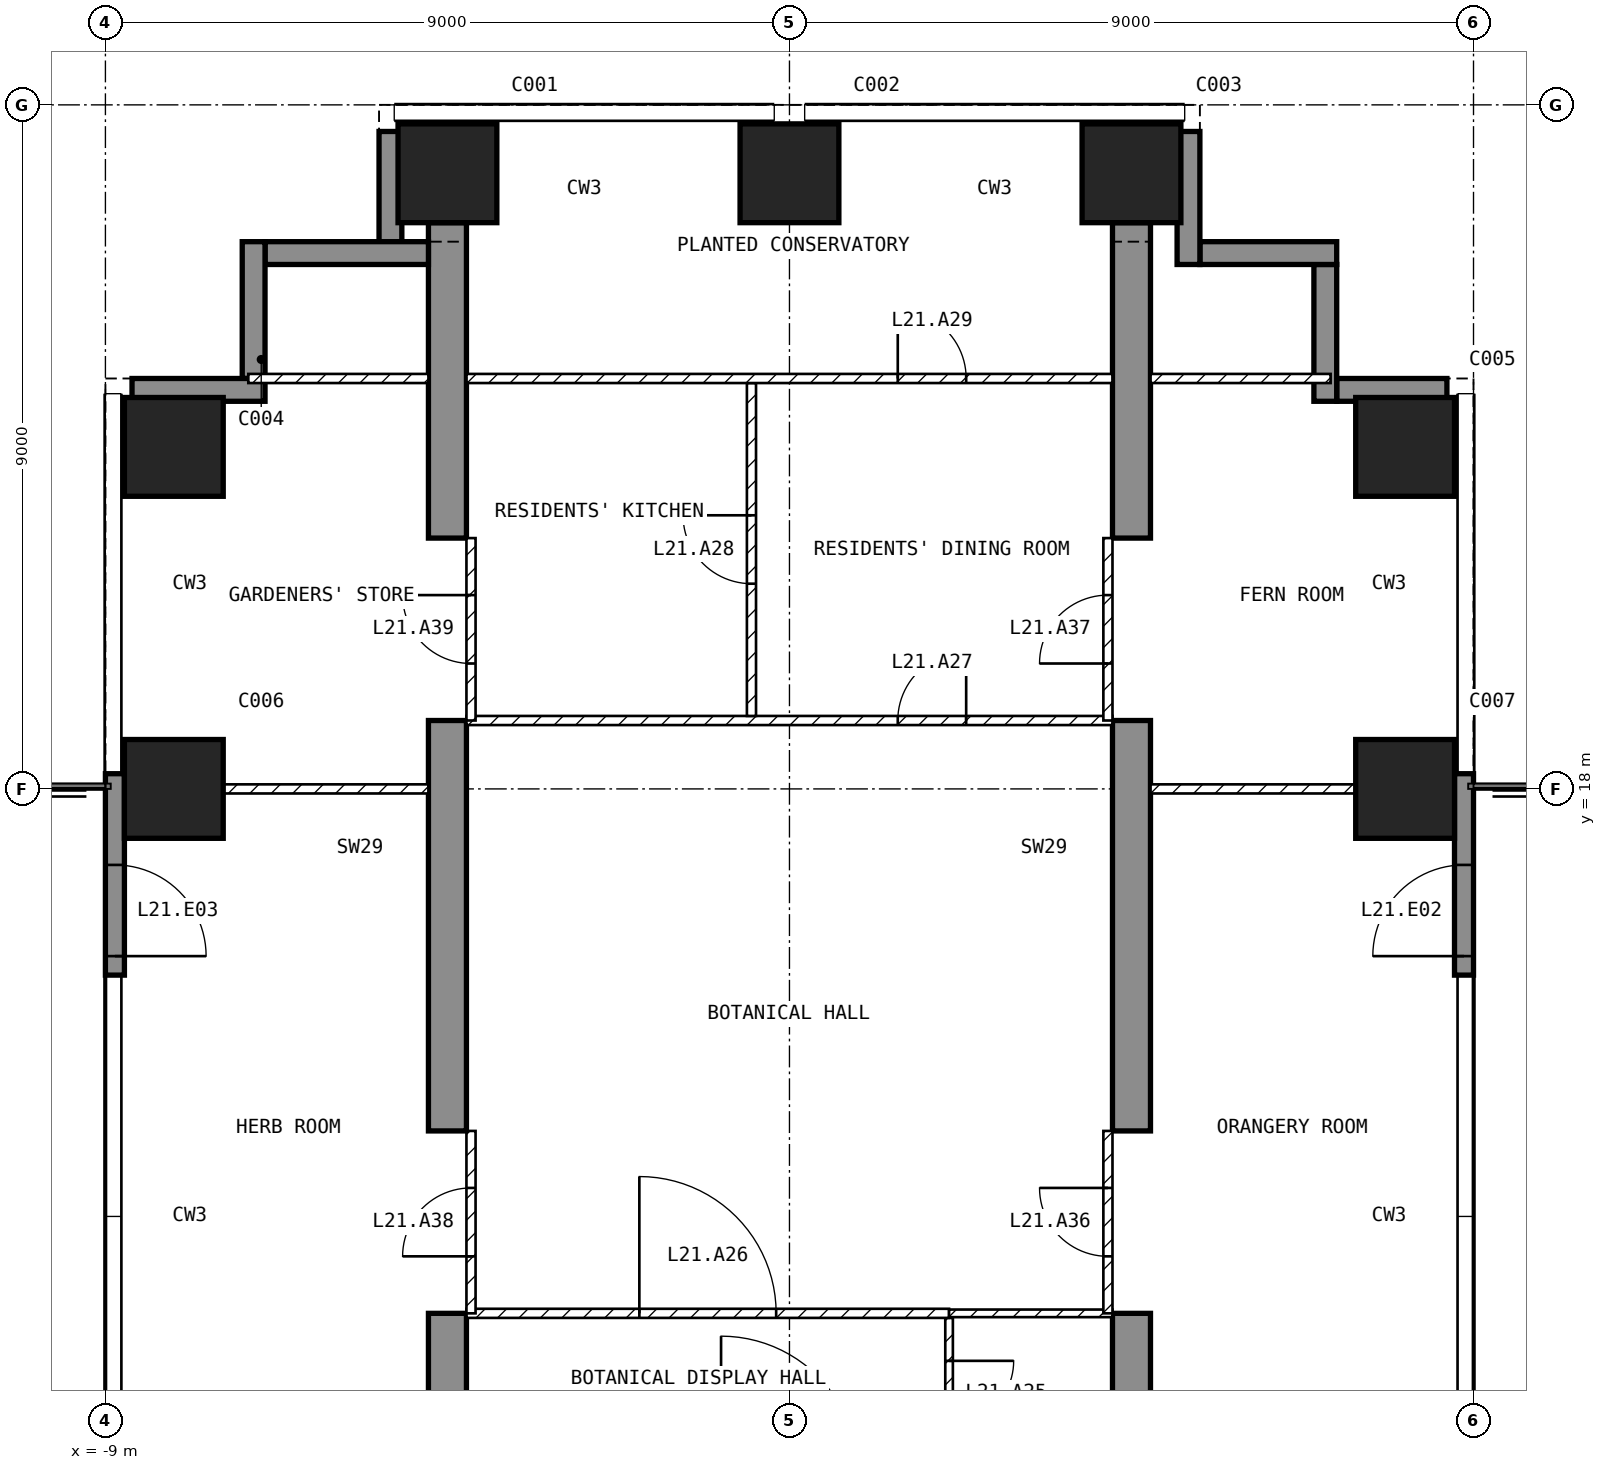
"""IFC4 building model, lengths in metres.
Left out: names, types, materials, properties, quantities, classifications, styles, units other than length and angle.
Written with IfcOpenShell. Run it as: python <this file> out.ifc"""

import sys

from ifc_helpers import new_model, si_unit, direction, frame, frame_2d, origin, origin_2d, place, context, subcontext, project, spatial, polyline, rectangle, outline, extrude, element, fill, save


model = new_model("IFC4")
c1 = context("Model", 3, precision=1e-05, world=origin(), true_north=direction((0.0, 1.0)))
c2 = subcontext(c1, "Body", "Model", "MODEL_VIEW")
j1 = project(units=[si_unit("LENGTHUNIT", "METRE"), si_unit("PLANEANGLEUNIT", "RADIAN")], contexts=[c1])
p1 = place(None, origin())
s1 = spatial("IfcSite", under=j1, at=p1, CompositionType="ELEMENT")
p2 = place(p1, origin())
s2 = spatial("IfcBuilding", under=s1, at=p2, CompositionType="ELEMENT")
p3 = place(p2, frame((0.0, 0.0, 92.5)))
s3 = spatial("IfcBuildingStorey", under=s2, at=p3, CompositionType="ELEMENT", Elevation=92.5)
for number, where, z_axis, x_axis in (
    (1, (-8.1, 18.0, -0.3), (0.0, 0.0, 1.0), (1.0, 0.0, 0.0)),
    (2, (-8.1, 22.5, -0.3), (0.0, 0.0, 1.0), (1.0, 0.0, 0.0)),
    (3, (-4.5, 26.1, -0.3), (0.0, 0.0, 1.0), (1.0, 0.0, 0.0)),
    (4, (0.0, 26.1, -0.3), (0.0, 0.0, 1.0), (1.0, 0.0, 0.0)),
    (5, (4.5, 26.1, -0.3), (0.0, 0.0, 1.0), (1.0, 0.0, 0.0)),
    (6, (8.1, 18.0, -0.3), (0.0, 0.0, 1.0), (1.0, 0.0, 0.0)),
    (7, (8.1, 22.5, -0.3), (0.0, 0.0, 1.0), (1.0, 0.0, 0.0)),
):
    element("IfcColumn", number, at=place(p3, frame(where, z_axis=z_axis, x_axis=x_axis)), inside=s3, PredefinedType="COLUMN", context=c2, shape_type="SweptSolid", body=[
        extrude(rectangle(XDim=1.3, YDim=1.3, at=origin_2d()), origin(), (0.0, 0.0, 1.0), 5.25),
    ])
for number, where, z_axis, x_axis in (
    (8, (-4.75, 9.0, -0.3), (1.0, 0.0, 0.0), (0.0, 1.0, 0.0)),
    (9, (4.25, 9.0, -0.3), (1.0, 0.0, 0.0), (0.0, 1.0, 0.0)),
):
    element("IfcWall", number, at=place(p3, frame(where, z_axis=z_axis, x_axis=x_axis)), inside=s3, PredefinedType="SHEAR", context=c2, shape_type="SweptSolid", body=[
        extrude(outline(polyline([(0.0, 0.0), (2.1, 0.0), (2.1, 2.7), (4.5, 2.7), (4.5, 0.0), (9.9, 0.0), (9.9, 2.7), (12.3, 2.7), (12.3, 0.0), (16.45, 0.0), (16.45, 5.25), (0.0, 5.25), (0.0, 0.0)])), origin(), (0.0, 0.0, 1.0), 0.5),
    ])
p4 = place(p3, frame((8.875, 15.55, 0.0), z_axis=(0.0, 0.0, 1.0), x_axis=(0.0, 1.0, 0.0)))
e10 = element("IfcWall", 10, at=p4, inside=s3, PredefinedType="SOLIDWALL", context=c2, shape_type="SweptSolid", body=[
    extrude(rectangle(XDim=2.65, YDim=0.25, at=frame_2d((1.325, 0.0))), origin(), (0.0, 0.0, 1.0), 4.95),
])
p5 = place(p4, frame((0.25, 0.0, 0.0)))
e11 = element("IfcOpeningElement", 11, at=p5, cuts=e10, PredefinedType="OPENING", context=c2, shape_type="SweptSolid", body=[
    extrude(rectangle(XDim=1.2, YDim=2.4, at=frame_2d((0.6, 1.2))), frame((0.0, 0.135, 0.0), z_axis=(0.0, -1.0, 0.0), x_axis=(1.0, 0.0, 0.0)), (0.0, 0.0, 1.0), 0.27),
])
p6 = place(p3, frame((-8.875, 18.2, 0.0), z_axis=(0.0, 0.0, 1.0), x_axis=(0.0, -1.0, 0.0)))
e12 = element("IfcWall", 12, at=p6, inside=s3, PredefinedType="SOLIDWALL", context=c2, shape_type="SweptSolid", body=[
    extrude(rectangle(XDim=2.65, YDim=0.25, at=frame_2d((1.325, 0.0))), origin(), (0.0, 0.0, 1.0), 4.95),
])
p7 = place(p6, frame((1.2, 0.0, 0.0)))
e13 = element("IfcOpeningElement", 13, at=p7, cuts=e12, PredefinedType="OPENING", context=c2, shape_type="SweptSolid", body=[
    extrude(rectangle(XDim=1.2, YDim=2.4, at=frame_2d((0.6, 1.2))), frame((0.0, 0.135, 0.0), z_axis=(0.0, -1.0, 0.0), x_axis=(1.0, 0.0, 0.0)), (0.0, 0.0, 1.0), 0.27),
])
p8 = place(p3, frame((8.65, 23.25, 0.0), z_axis=(0.0, 0.0, 1.0), x_axis=(-1.0, 0.0, 0.0)))
e14 = element("IfcWall", 14, at=p8, inside=s3, PredefinedType="SOLIDWALL", context=c2, shape_type="SweptSolid", body=[
    extrude(rectangle(XDim=1.45, YDim=0.3, at=frame_2d((0.725, 0.0))), origin(), (0.0, 0.0, 1.0), 4.95),
])
p9 = place(p3, frame((7.05, 23.1, 0.0), z_axis=(0.0, 0.0, 1.0), x_axis=(0.0, 1.0, 0.0)))
e15 = element("IfcWall", 15, at=p9, inside=s3, PredefinedType="SOLIDWALL", context=c2, shape_type="SweptSolid", body=[
    extrude(rectangle(XDim=1.8, YDim=0.3, at=frame_2d((0.9, 0.0))), origin(), (0.0, 0.0, 1.0), 4.95),
])
p10 = place(p3, frame((7.2, 25.05, 0.0), z_axis=(0.0, 0.0, 1.0), x_axis=(-1.0, 0.0, 0.0)))
e16 = element("IfcWall", 16, at=p10, inside=s3, PredefinedType="SOLIDWALL", context=c2, shape_type="SweptSolid", body=[
    extrude(rectangle(XDim=1.8, YDim=0.3, at=frame_2d((0.9, 0.0))), origin(), (0.0, 0.0, 1.0), 4.95),
])
p11 = place(p3, frame((5.25, 24.9, 0.0), z_axis=(0.0, 0.0, 1.0), x_axis=(0.0, 1.0, 0.0)))
e17 = element("IfcWall", 17, at=p11, inside=s3, PredefinedType="SOLIDWALL", context=c2, shape_type="SweptSolid", body=[
    extrude(rectangle(XDim=1.75, YDim=0.3, at=frame_2d((0.875, 0.0))), origin(), (0.0, 0.0, 1.0), 4.95),
])
p12 = place(p3, frame((-5.25, 26.65, 0.0), z_axis=(0.0, 0.0, 1.0), x_axis=(0.0, -1.0, 0.0)))
e18 = element("IfcWall", 18, at=p12, inside=s3, PredefinedType="SOLIDWALL", context=c2, shape_type="SweptSolid", body=[
    extrude(rectangle(XDim=1.45, YDim=0.3, at=frame_2d((0.725, 0.0))), origin(), (0.0, 0.0, 1.0), 4.95),
])
p13 = place(p3, frame((-4.75, 25.05, 0.0), z_axis=(0.0, 0.0, 1.0), x_axis=(-1.0, 0.0, 0.0)))
e19 = element("IfcWall", 19, at=p13, inside=s3, PredefinedType="SOLIDWALL", context=c2, shape_type="SweptSolid", body=[
    extrude(rectangle(XDim=2.15, YDim=0.3, at=frame_2d((1.075, 0.0))), origin(), (0.0, 0.0, 1.0), 4.95),
])
p14 = place(p3, frame((-7.05, 25.2, 0.0), z_axis=(0.0, 0.0, 1.0), x_axis=(0.0, -1.0, 0.0)))
e20 = element("IfcWall", 20, at=p14, inside=s3, PredefinedType="SOLIDWALL", context=c2, shape_type="SweptSolid", body=[
    extrude(rectangle(XDim=1.8, YDim=0.3, at=frame_2d((0.9, 0.0))), origin(), (0.0, 0.0, 1.0), 4.95),
])
p15 = place(p3, frame((-6.9, 23.25, 0.0), z_axis=(0.0, 0.0, 1.0), x_axis=(-1.0, 0.0, 0.0)))
e21 = element("IfcWall", 21, at=p15, inside=s3, PredefinedType="SOLIDWALL", context=c2, shape_type="SweptSolid", body=[
    extrude(rectangle(XDim=1.75, YDim=0.3, at=frame_2d((0.875, 0.0))), origin(), (0.0, 0.0, 1.0), 4.95),
])
p16 = place(p3, frame((2.1, 11.04, 0.0), z_axis=(0.0, 0.0, 1.0), x_axis=(0.0, -1.0, 0.0)))
e22 = element("IfcWall", 22, at=p16, inside=s3, PredefinedType="PARTITIONING", context=c2, shape_type="SweptSolid", body=[
    extrude(rectangle(XDim=1.98, YDim=0.1, at=frame_2d((0.99, 0.0))), origin(), (0.0, 0.0, 1.0), 4.95),
])
p17 = place(p16, frame((0.565, 0.0, 0.0)))
e23 = element("IfcOpeningElement", 23, at=p17, cuts=e22, PredefinedType="OPENING", context=c2, shape_type="SweptSolid", body=[
    extrude(rectangle(XDim=0.85, YDim=2.1, at=frame_2d((0.425, 1.05))), frame((0.0, 0.06, 0.0), z_axis=(0.0, -1.0, 0.0), x_axis=(1.0, 0.0, 0.0)), (0.0, 0.0, 1.0), 0.12),
])
p18 = place(p3, frame((-4.25, 11.1, 0.0), z_axis=(0.0, 0.0, 1.0), x_axis=(1.0, 0.0, 0.0)))
e24 = element("IfcWall", 24, at=p18, inside=s3, PredefinedType="PARTITIONING", context=c2, shape_type="SweptSolid", body=[
    extrude(rectangle(XDim=6.35, YDim=0.12, at=frame_2d((3.175, 0.0))), origin(), (0.0, 0.0, 1.0), 4.95),
])
p19 = place(p18, frame((2.275, 0.0, 0.0)))
e25 = element("IfcOpeningElement", 25, at=p19, cuts=e24, PredefinedType="OPENING", context=c2, shape_type="SweptSolid", body=[
    extrude(rectangle(XDim=1.8, YDim=2.1, at=frame_2d((0.9, 1.05))), frame((0.0, 0.07, 0.0), z_axis=(0.0, -1.0, 0.0), x_axis=(1.0, 0.0, 0.0)), (0.0, 0.0, 1.0), 0.14),
])
p20 = place(p3, frame((2.1, 11.1, 0.0), z_axis=(0.0, 0.0, 1.0), x_axis=(1.0, 0.0, 0.0)))
e26 = element("IfcWall", 26, at=p20, inside=s3, PredefinedType="PARTITIONING", context=c2, shape_type="SweptSolid", body=[
    extrude(rectangle(XDim=2.15, YDim=0.1, at=frame_2d((1.075, 0.0))), origin(), (0.0, 0.0, 1.0), 4.95),
])
p21 = place(p3, frame((-4.25, 18.9, 0.0), z_axis=(0.0, 0.0, 1.0), x_axis=(1.0, 0.0, 0.0)))
e27 = element("IfcWall", 27, at=p21, inside=s3, PredefinedType="PARTITIONING", context=c2, shape_type="SweptSolid", body=[
    extrude(rectangle(XDim=8.5, YDim=0.12, at=frame_2d((4.25, 0.0))), origin(), (0.0, 0.0, 1.0), 4.95),
])
p22 = place(p21, frame((5.675, 0.0, 0.0)))
e28 = element("IfcOpeningElement", 28, at=p22, cuts=e27, PredefinedType="OPENING", context=c2, shape_type="SweptSolid", body=[
    extrude(rectangle(XDim=0.9, YDim=2.1, at=frame_2d((0.45, 1.05))), frame((0.0, 0.07, 0.0), z_axis=(0.0, -1.0, 0.0), x_axis=(1.0, 0.0, 0.0)), (0.0, 0.0, 1.0), 0.14),
])
p23 = place(p3, frame((-0.5, 18.96, 0.0), z_axis=(0.0, 0.0, 1.0), x_axis=(0.0, 1.0, 0.0)))
e29 = element("IfcWall", 29, at=p23, inside=s3, PredefinedType="PARTITIONING", context=c2, shape_type="SweptSolid", body=[
    extrude(rectangle(XDim=4.38, YDim=0.12, at=frame_2d((2.19, 0.0))), origin(), (0.0, 0.0, 1.0), 4.95),
])
p24 = place(p23, frame((1.74, 0.0, 0.0)))
e30 = element("IfcOpeningElement", 30, at=p24, cuts=e29, PredefinedType="OPENING", context=c2, shape_type="SweptSolid", body=[
    extrude(rectangle(XDim=0.9, YDim=2.1, at=frame_2d((0.45, 1.05))), frame((0.0, 0.07, 0.0), z_axis=(0.0, -1.0, 0.0), x_axis=(1.0, 0.0, 0.0)), (0.0, 0.0, 1.0), 0.14),
])
p25 = place(p3, frame((-4.25, 23.4, 0.0), z_axis=(0.0, 0.0, 1.0), x_axis=(1.0, 0.0, 0.0)))
e31 = element("IfcWall", 31, at=p25, inside=s3, PredefinedType="PARTITIONING", context=c2, shape_type="SweptSolid", body=[
    extrude(rectangle(XDim=8.5, YDim=0.12, at=frame_2d((4.25, 0.0))), origin(), (0.0, 0.0, 1.0), 4.95),
])
p26 = place(p25, frame((5.675, 0.0, 0.0)))
e32 = element("IfcOpeningElement", 32, at=p26, cuts=e31, PredefinedType="OPENING", context=c2, shape_type="SweptSolid", body=[
    extrude(rectangle(XDim=0.9, YDim=2.1, at=frame_2d((0.45, 1.05))), frame((0.0, 0.07, 0.0), z_axis=(0.0, -1.0, 0.0), x_axis=(1.0, 0.0, 0.0)), (0.0, 0.0, 1.0), 0.14),
])
p27 = place(p3, frame((4.75, 18.0, 0.0), z_axis=(0.0, 0.0, 1.0), x_axis=(1.0, 0.0, 0.0)))
e33 = element("IfcWall", 33, at=p27, inside=s3, PredefinedType="PARTITIONING", context=c2, shape_type="SweptSolid", body=[
    extrude(rectangle(XDim=2.7, YDim=0.12, at=frame_2d((1.35, 0.0))), origin(), (0.0, 0.0, 1.0), 4.046),
])
p28 = place(p3, frame((4.75, 23.4, 0.0), z_axis=(0.0, 0.0, 1.0), x_axis=(1.0, 0.0, 0.0)))
e34 = element("IfcWall", 34, at=p28, inside=s3, PredefinedType="PARTITIONING", context=c2, shape_type="SweptSolid", body=[
    extrude(rectangle(XDim=2.37, YDim=0.12, at=frame_2d((1.185, 0.0))), origin(), (0.0, 0.0, 1.0), 4.95),
])
p29 = place(p3, frame((-7.45, 18.0, 0.0), z_axis=(0.0, 0.0, 1.0), x_axis=(1.0, 0.0, 0.0)))
e35 = element("IfcWall", 35, at=p29, inside=s3, PredefinedType="PARTITIONING", context=c2, shape_type="SweptSolid", body=[
    extrude(rectangle(XDim=2.7, YDim=0.12, at=frame_2d((1.35, 0.0))), origin(), (0.0, 0.0, 1.0), 4.046),
])
p30 = place(p3, frame((-7.12, 23.4, 0.0), z_axis=(0.0, 0.0, 1.0), x_axis=(1.0, 0.0, 0.0)))
e36 = element("IfcWall", 36, at=p30, inside=s3, PredefinedType="PARTITIONING", context=c2, shape_type="SweptSolid", body=[
    extrude(rectangle(XDim=2.37, YDim=0.12, at=frame_2d((1.185, 0.0))), origin(), (0.0, 0.0, 1.0), 4.95),
])
p31 = place(p3, frame((4.19, 11.1, 0.0), z_axis=(0.0, 0.0, 1.0), x_axis=(0.0, 1.0, 0.0)))
e37 = element("IfcWall", 37, at=p31, inside=s3, PredefinedType="PARTITIONING", context=c2, shape_type="SweptSolid", body=[
    extrude(rectangle(XDim=2.4, YDim=0.12, at=frame_2d((1.2, 0.0))), origin(), (0.0, 0.0, 1.0), 2.4),
])
p32 = place(p31, frame((0.75, 0.0, 0.0)))
e38 = element("IfcOpeningElement", 38, at=p32, cuts=e37, PredefinedType="OPENING", context=c2, shape_type="SweptSolid", body=[
    extrude(rectangle(XDim=0.9, YDim=2.1, at=frame_2d((0.45, 1.05))), frame((0.0, 0.07, 0.0), z_axis=(0.0, -1.0, 0.0), x_axis=(1.0, 0.0, 0.0)), (0.0, 0.0, 1.0), 0.14),
])
p33 = place(p3, frame((4.19, 18.9, 0.0), z_axis=(0.0, 0.0, 1.0), x_axis=(0.0, 1.0, 0.0)))
e39 = element("IfcWall", 39, at=p33, inside=s3, PredefinedType="PARTITIONING", context=c2, shape_type="SweptSolid", body=[
    extrude(rectangle(XDim=2.4, YDim=0.12, at=frame_2d((1.2, 0.0))), origin(), (0.0, 0.0, 1.0), 2.4),
])
p34 = place(p33, frame((0.75, 0.0, 0.0)))
e40 = element("IfcOpeningElement", 40, at=p34, cuts=e39, PredefinedType="OPENING", context=c2, shape_type="SweptSolid", body=[
    extrude(rectangle(XDim=0.9, YDim=2.1, at=frame_2d((0.45, 1.05))), frame((0.0, 0.07, 0.0), z_axis=(0.0, -1.0, 0.0), x_axis=(1.0, 0.0, 0.0)), (0.0, 0.0, 1.0), 0.14),
])
p35 = place(p3, frame((-4.19, 11.1, 0.0), z_axis=(0.0, 0.0, 1.0), x_axis=(0.0, 1.0, 0.0)))
e41 = element("IfcWall", 41, at=p35, inside=s3, PredefinedType="PARTITIONING", context=c2, shape_type="SweptSolid", body=[
    extrude(rectangle(XDim=2.4, YDim=0.12, at=frame_2d((1.2, 0.0))), origin(), (0.0, 0.0, 1.0), 2.4),
])
p36 = place(p35, frame((0.75, 0.0, 0.0)))
e42 = element("IfcOpeningElement", 42, at=p36, cuts=e41, PredefinedType="OPENING", context=c2, shape_type="SweptSolid", body=[
    extrude(rectangle(XDim=0.9, YDim=2.1, at=frame_2d((0.45, 1.05))), frame((0.0, 0.07, 0.0), z_axis=(0.0, -1.0, 0.0), x_axis=(1.0, 0.0, 0.0)), (0.0, 0.0, 1.0), 0.14),
])
p37 = place(p3, frame((-4.19, 18.9, 0.0), z_axis=(0.0, 0.0, 1.0), x_axis=(0.0, 1.0, 0.0)))
e43 = element("IfcWall", 43, at=p37, inside=s3, PredefinedType="PARTITIONING", context=c2, shape_type="SweptSolid", body=[
    extrude(rectangle(XDim=2.4, YDim=0.12, at=frame_2d((1.2, 0.0))), origin(), (0.0, 0.0, 1.0), 2.4),
])
p38 = place(p37, frame((0.75, 0.0, 0.0)))
e44 = element("IfcOpeningElement", 44, at=p38, cuts=e43, PredefinedType="OPENING", context=c2, shape_type="SweptSolid", body=[
    extrude(rectangle(XDim=0.9, YDim=2.1, at=frame_2d((0.45, 1.05))), frame((0.0, 0.07, 0.0), z_axis=(0.0, -1.0, 0.0), x_axis=(1.0, 0.0, 0.0)), (0.0, 0.0, 1.0), 0.14),
])
p39 = place(p5, origin())
e45 = element("IfcDoor", 45, at=p39, inside=s3, OperationType="SINGLE_SWING_LEFT", PredefinedType="DOOR", context=c2, shape_type="SweptSolid", body=[
    extrude(rectangle(XDim=1.2, YDim=2.4, at=frame_2d((0.6, 1.2))), frame((0.0, 0.025, 0.0), z_axis=(0.0, -1.0, 0.0), x_axis=(1.0, 0.0, 0.0)), (0.0, 0.0, 1.0), 0.05),
])
fill(e11, e45)
p40 = place(p7, origin())
e46 = element("IfcDoor", 46, at=p40, inside=s3, OperationType="SINGLE_SWING_RIGHT", PredefinedType="DOOR", context=c2, shape_type="SweptSolid", body=[
    extrude(rectangle(XDim=1.2, YDim=2.4, at=frame_2d((0.6, 1.2))), frame((0.0, 0.025, 0.0), z_axis=(0.0, -1.0, 0.0), x_axis=(1.0, 0.0, 0.0)), (0.0, 0.0, 1.0), 0.05),
])
fill(e13, e46)
p41 = place(p17, origin())
e47 = element("IfcDoor", 47, at=p41, inside=s3, OperationType="SINGLE_SWING_LEFT", PredefinedType="DOOR", context=c2, shape_type="SweptSolid", body=[
    extrude(rectangle(XDim=0.85, YDim=2.1, at=frame_2d((0.425, 1.05))), frame((0.0, 0.025, 0.0), z_axis=(0.0, -1.0, 0.0), x_axis=(1.0, 0.0, 0.0)), (0.0, 0.0, 1.0), 0.05),
])
fill(e23, e47)
p42 = place(p19, origin())
e48 = element("IfcDoor", 48, at=p42, inside=s3, OperationType="SINGLE_SWING_LEFT", PredefinedType="DOOR", context=c2, shape_type="SweptSolid", body=[
    extrude(rectangle(XDim=1.8, YDim=2.1, at=frame_2d((0.9, 1.05))), frame((0.0, 0.025, 0.0), z_axis=(0.0, -1.0, 0.0), x_axis=(1.0, 0.0, 0.0)), (0.0, 0.0, 1.0), 0.05),
])
fill(e25, e48)
p43 = place(p22, origin())
e49 = element("IfcDoor", 49, at=p43, inside=s3, OperationType="SINGLE_SWING_RIGHT", PredefinedType="DOOR", context=c2, shape_type="SweptSolid", body=[
    extrude(rectangle(XDim=0.9, YDim=2.1, at=frame_2d((0.45, 1.05))), frame((0.0, 0.025, 0.0), z_axis=(0.0, -1.0, 0.0), x_axis=(1.0, 0.0, 0.0)), (0.0, 0.0, 1.0), 0.05),
])
fill(e28, e49)
p44 = place(p24, origin())
e50 = element("IfcDoor", 50, at=p44, inside=s3, OperationType="SINGLE_SWING_RIGHT", PredefinedType="DOOR", context=c2, shape_type="SweptSolid", body=[
    extrude(rectangle(XDim=0.9, YDim=2.1, at=frame_2d((0.45, 1.05))), frame((0.0, 0.025, 0.0), z_axis=(0.0, -1.0, 0.0), x_axis=(1.0, 0.0, 0.0)), (0.0, 0.0, 1.0), 0.05),
])
fill(e30, e50)
p45 = place(p26, origin())
e51 = element("IfcDoor", 51, at=p45, inside=s3, OperationType="SINGLE_SWING_LEFT", PredefinedType="DOOR", context=c2, shape_type="SweptSolid", body=[
    extrude(rectangle(XDim=0.9, YDim=2.1, at=frame_2d((0.45, 1.05))), frame((0.0, 0.025, 0.0), z_axis=(0.0, -1.0, 0.0), x_axis=(1.0, 0.0, 0.0)), (0.0, 0.0, 1.0), 0.05),
])
fill(e32, e51)
p46 = place(p32, origin())
e52 = element("IfcDoor", 52, at=p46, inside=s3, OperationType="SINGLE_SWING_RIGHT", PredefinedType="DOOR", context=c2, shape_type="SweptSolid", body=[
    extrude(rectangle(XDim=0.9, YDim=2.1, at=frame_2d((0.45, 1.05))), frame((0.0, 0.025, 0.0), z_axis=(0.0, -1.0, 0.0), x_axis=(1.0, 0.0, 0.0)), (0.0, 0.0, 1.0), 0.05),
])
fill(e38, e52)
p47 = place(p34, origin())
e53 = element("IfcDoor", 53, at=p47, inside=s3, OperationType="SINGLE_SWING_LEFT", PredefinedType="DOOR", context=c2, shape_type="SweptSolid", body=[
    extrude(rectangle(XDim=0.9, YDim=2.1, at=frame_2d((0.45, 1.05))), frame((0.0, 0.025, 0.0), z_axis=(0.0, -1.0, 0.0), x_axis=(1.0, 0.0, 0.0)), (0.0, 0.0, 1.0), 0.05),
])
fill(e40, e53)
p48 = place(p36, origin())
e54 = element("IfcDoor", 54, at=p48, inside=s3, OperationType="SINGLE_SWING_LEFT", PredefinedType="DOOR", context=c2, shape_type="SweptSolid", body=[
    extrude(rectangle(XDim=0.9, YDim=2.1, at=frame_2d((0.45, 1.05))), frame((0.0, 0.025, 0.0), z_axis=(0.0, -1.0, 0.0), x_axis=(1.0, 0.0, 0.0)), (0.0, 0.0, 1.0), 0.05),
])
fill(e42, e54)
p49 = place(p38, origin())
e55 = element("IfcDoor", 55, at=p49, inside=s3, OperationType="SINGLE_SWING_RIGHT", PredefinedType="DOOR", context=c2, shape_type="SweptSolid", body=[
    extrude(rectangle(XDim=0.9, YDim=2.1, at=frame_2d((0.45, 1.05))), frame((0.0, 0.025, 0.0), z_axis=(0.0, -1.0, 0.0), x_axis=(1.0, 0.0, 0.0)), (0.0, 0.0, 1.0), 0.05),
])
fill(e44, e55)
save(model, sys.argv[1])
